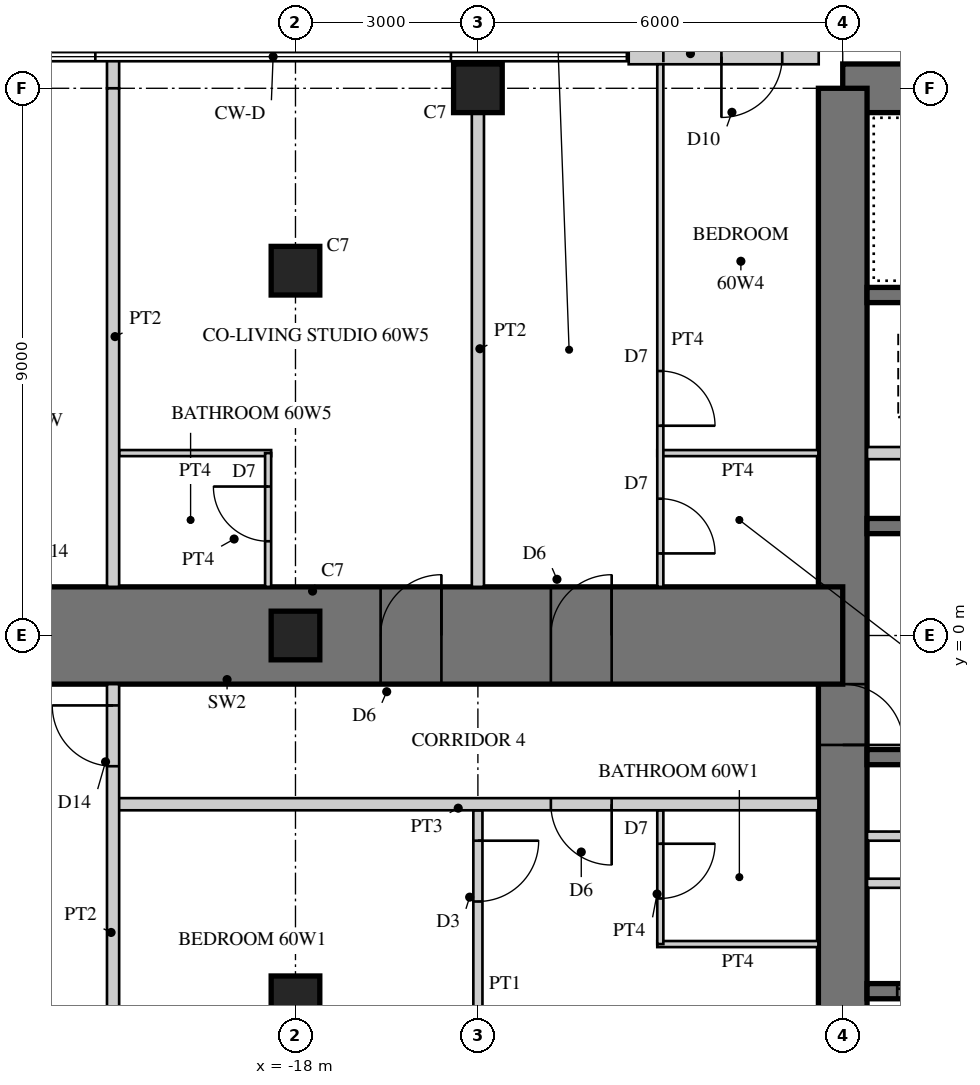
"""IFC4 building model, lengths in metres.
Left out: names, types, materials, properties, quantities, classifications, styles, units other than length and angle.
Written with IfcOpenShell. Run it as: python <this file> out.ifc"""

import sys

from ifc_helpers import new_model, si_unit, direction, frame, frame_2d, origin, origin_2d, place, context, subcontext, project, spatial, rectangle, hollow_rectangle, extrude, element, fill, save


model = new_model("IFC4")
c1 = context("Model", 3, precision=1e-05, world=origin(), true_north=direction((0.0, 1.0)))
c2 = subcontext(c1, "Body", "Model", "MODEL_VIEW")
j1 = project(units=[si_unit("LENGTHUNIT", "METRE"), si_unit("PLANEANGLEUNIT", "RADIAN")], contexts=[c1])
p1 = place(None, origin())
s1 = spatial("IfcSite", under=j1, at=p1, CompositionType="ELEMENT")
p2 = place(p1, origin())
s2 = spatial("IfcBuilding", under=s1, at=p2, CompositionType="ELEMENT")
p3 = place(p2, frame((0.0, 0.0, 235.7)))
s3 = spatial("IfcBuildingStorey", under=s2, at=p3, CompositionType="ELEMENT", Elevation=235.7)
p4 = place(p3, frame((9.0, 9.0, 0.0), z_axis=(0.0, 0.0, 1.0), x_axis=(-1.0, 0.0, 0.0)))
e1 = element("IfcWall", 1, at=p4, inside=s3, PredefinedType="SHEAR", context=c2, shape_type="SweptSolid", body=[
    extrude(rectangle(XDim=18.0, YDim=0.8, at=frame_2d((9.0, 0.0))), origin(), (0.0, 0.0, 1.0), 3.4),
])
p5 = place(p4, frame((9.8, 0.0, 0.0)))
e2 = element("IfcOpeningElement", 2, at=p5, cuts=e1, PredefinedType="OPENING", context=c2, shape_type="SweptSolid", body=[
    extrude(rectangle(XDim=1.0, YDim=2.4, at=frame_2d((0.5, 1.2))), frame((0.0, 0.41, 0.0), z_axis=(0.0, -1.0, 0.0), x_axis=(1.0, 0.0, 0.0)), (0.0, 0.0, 1.0), 0.82),
])
p6 = place(p3, frame((-9.0, 9.0, 0.0), z_axis=(0.0, 0.0, 1.0), x_axis=(0.0, -1.0, 0.0)))
e3 = element("IfcWall", 3, at=p6, inside=s3, PredefinedType="SHEAR", context=c2, shape_type="SweptSolid", body=[
    extrude(rectangle(XDim=18.0, YDim=0.8, at=frame_2d((9.0, 0.0))), origin(), (0.0, 0.0, 1.0), 3.4),
])
p7 = place(p6, frame((9.8, 0.0, 0.0)))
e4 = element("IfcOpeningElement", 4, at=p7, cuts=e3, PredefinedType="OPENING", context=c2, shape_type="SweptSolid", body=[
    extrude(rectangle(XDim=1.0, YDim=2.4, at=frame_2d((0.5, 1.2))), frame((0.0, 0.41, 0.0), z_axis=(0.0, -1.0, 0.0), x_axis=(1.0, 0.0, 0.0)), (0.0, 0.0, 1.0), 0.82),
])
p8 = place(p3, frame((-2.125, 1.8, 0.0), z_axis=(0.0, 0.0, 1.0), x_axis=(-1.0, 0.0, 0.0)))
e5 = element("IfcWall", 5, at=p8, inside=s3, PredefinedType="SHEAR", context=c2, shape_type="SweptSolid", body=[
    extrude(rectangle(XDim=6.475, YDim=0.25, at=frame_2d((3.238, 0.0))), origin(), (0.0, 0.0, 1.0), 3.4),
])
p9 = place(p3, frame((-2.125, 5.6, 0.0), z_axis=(0.0, 0.0, 1.0), x_axis=(-1.0, 0.0, 0.0)))
e6 = element("IfcWall", 6, at=p9, inside=s3, PredefinedType="SHEAR", context=c2, shape_type="SweptSolid", body=[
    extrude(rectangle(XDim=6.475, YDim=0.25, at=frame_2d((3.238, 0.0))), origin(), (0.0, 0.0, 1.0), 3.4),
])
p10 = place(p9, frame((0.175, 0.0, 0.0)))
e7 = element("IfcOpeningElement", 7, at=p10, cuts=e6, PredefinedType="OPENING", context=c2, shape_type="SweptSolid", body=[
    extrude(rectangle(XDim=1.0, YDim=2.1, at=frame_2d((0.5, 1.05))), frame((0.0, 0.135, 0.0), z_axis=(0.0, -1.0, 0.0), x_axis=(1.0, 0.0, 0.0)), (0.0, 0.0, 1.0), 0.27),
])
p11 = place(p3, frame((-5.725, 3.0, 0.0), z_axis=(0.0, 0.0, 1.0), x_axis=(-1.0, 0.0, 0.0)))
e8 = element("IfcWall", 8, at=p11, inside=s3, PredefinedType="PARTITIONING", context=c2, shape_type="SweptSolid", body=[
    extrude(rectangle(XDim=2.875, YDim=0.2, at=frame_2d((1.438, 0.0))), origin(), (0.0, 0.0, 1.0), 3.4),
])
p12 = place(p3, frame((-1.925, -2.0, 0.0), z_axis=(0.0, 0.0, 1.0), x_axis=(-1.0, 0.0, 0.0)))
e9 = element("IfcWall", 9, at=p12, inside=s3, PredefinedType="SHEAR", context=c2, shape_type="SweptSolid", body=[
    extrude(rectangle(XDim=6.675, YDim=0.25, at=frame_2d((3.337, 0.0))), origin(), (0.0, 0.0, 1.0), 3.4),
])
p13 = place(p3, frame((-1.925, -5.85, 0.0), z_axis=(0.0, 0.0, 1.0), x_axis=(-1.0, 0.0, 0.0)))
e10 = element("IfcWall", 10, at=p13, inside=s3, PredefinedType="SHEAR", context=c2, shape_type="SweptSolid", body=[
    extrude(rectangle(XDim=6.675, YDim=0.25, at=frame_2d((3.337, 0.0))), origin(), (0.0, 0.0, 1.0), 3.4),
])
p14 = place(p13, frame((0.496, 0.0, 0.0)))
e11 = element("IfcOpeningElement", 11, at=p14, cuts=e10, PredefinedType="OPENING", context=c2, shape_type="SweptSolid", body=[
    extrude(rectangle(XDim=1.1, YDim=2.2, at=frame_2d((0.55, 1.1))), frame((0.0, 0.135, 0.0), z_axis=(0.0, -1.0, 0.0), x_axis=(1.0, 0.0, 0.0)), (0.0, 0.0, 1.0), 0.27),
])
p15 = place(p13, frame((2.788, 0.0, 0.0)))
e12 = element("IfcOpeningElement", 12, at=p15, cuts=e10, PredefinedType="OPENING", context=c2, shape_type="SweptSolid", body=[
    extrude(rectangle(XDim=1.1, YDim=2.2, at=frame_2d((0.55, 1.1))), frame((0.0, 0.135, 0.0), z_axis=(0.0, -1.0, 0.0), x_axis=(1.0, 0.0, 0.0)), (0.0, 0.0, 1.0), 0.27),
])
p16 = place(p13, frame((5.079, 0.0, 0.0)))
e13 = element("IfcOpeningElement", 13, at=p16, cuts=e10, PredefinedType="OPENING", context=c2, shape_type="SweptSolid", body=[
    extrude(rectangle(XDim=1.1, YDim=2.2, at=frame_2d((0.55, 1.1))), frame((0.0, 0.135, 0.0), z_axis=(0.0, -1.0, 0.0), x_axis=(1.0, 0.0, 0.0)), (0.0, 0.0, 1.0), 0.27),
])
p17 = place(p3, frame((-1.925, -3.3, 0.0), z_axis=(0.0, 0.0, 1.0), x_axis=(-1.0, 0.0, 0.0)))
e14 = element("IfcWall", 14, at=p17, inside=s3, PredefinedType="PARTITIONING", context=c2, shape_type="SweptSolid", body=[
    extrude(rectangle(XDim=6.675, YDim=0.15, at=frame_2d((3.337, 0.0))), origin(), (0.0, 0.0, 1.0), 3.4),
])
p18 = place(p17, frame((0.075, 0.0, 0.0)))
e15 = element("IfcOpeningElement", 15, at=p18, cuts=e14, PredefinedType="OPENING", context=c2, shape_type="SweptSolid", body=[
    extrude(rectangle(XDim=0.8, YDim=2.1, at=frame_2d((0.4, 1.05))), frame((0.0, 0.085, 0.0), z_axis=(0.0, -1.0, 0.0), x_axis=(1.0, 0.0, 0.0)), (0.0, 0.0, 1.0), 0.17),
])
p19 = place(p17, frame((3.675, 0.0, 0.0)))
e16 = element("IfcOpeningElement", 16, at=p19, cuts=e14, PredefinedType="OPENING", context=c2, shape_type="SweptSolid", body=[
    extrude(rectangle(XDim=0.8, YDim=2.1, at=frame_2d((0.4, 1.05))), frame((0.0, 0.085, 0.0), z_axis=(0.0, -1.0, 0.0), x_axis=(1.0, 0.0, 0.0)), (0.0, 0.0, 1.0), 0.17),
])
p20 = place(p3, frame((-9.0, 0.0, 0.0), z_axis=(0.0, 0.0, 1.0), x_axis=(-1.0, 0.0, 0.0)))
e17 = element("IfcWall", 17, at=p20, inside=s3, PredefinedType="SHEAR", context=c2, shape_type="SweptSolid", body=[
    extrude(rectangle(XDim=18.0, YDim=1.6, at=frame_2d((9.0, 0.0))), origin(), (0.0, 0.0, 1.0), 3.4),
])
p21 = place(p20, frame((3.8, 0.0, 0.0)))
e18 = element("IfcOpeningElement", 18, at=p21, cuts=e17, PredefinedType="OPENING", context=c2, shape_type="SweptSolid", body=[
    extrude(rectangle(XDim=1.0, YDim=2.15, at=frame_2d((0.5, 1.075))), frame((0.0, 0.81, 0.0), z_axis=(0.0, -1.0, 0.0), x_axis=(1.0, 0.0, 0.0)), (0.0, 0.0, 1.0), 1.62),
])
p22 = place(p20, frame((6.6, 0.0, 0.0)))
e19 = element("IfcOpeningElement", 19, at=p22, cuts=e17, PredefinedType="OPENING", context=c2, shape_type="SweptSolid", body=[
    extrude(rectangle(XDim=1.0, YDim=2.15, at=frame_2d((0.5, 1.075))), frame((0.0, 0.81, 0.0), z_axis=(0.0, -1.0, 0.0), x_axis=(1.0, 0.0, 0.0)), (0.0, 0.0, 1.0), 1.62),
])
p23 = place(p20, frame((13.3, 0.0, 0.0)))
e20 = element("IfcOpeningElement", 20, at=p23, cuts=e17, PredefinedType="OPENING", context=c2, shape_type="SweptSolid", body=[
    extrude(rectangle(XDim=1.0, YDim=2.2, at=frame_2d((0.5, 1.1))), frame((0.0, 0.81, 0.0), z_axis=(0.0, -1.0, 0.0), x_axis=(1.0, 0.0, 0.0)), (0.0, 0.0, 1.0), 1.62),
])
for number, where, z_axis, x_axis in (
    (21, (-15.0, 9.0, 0.0), (0.0, 0.0, 1.0), (1.0, 0.0, 0.0)),
    (22, (-18.0, 6.0, 0.0), (0.0, 0.0, 1.0), (1.0, 0.0, 0.0)),
    (23, (-18.0, 0.0, 0.0), (0.0, 0.0, 1.0), (1.0, 0.0, 0.0)),
    (24, (-18.0, -6.0, 0.0), (0.0, 0.0, 1.0), (1.0, 0.0, 0.0)),
):
    element("IfcColumn", number, at=place(p3, frame(where, z_axis=z_axis, x_axis=x_axis)), inside=s3, PredefinedType="COLUMN", context=c2, shape_type="SweptSolid", body=[
        extrude(rectangle(XDim=0.8, YDim=0.8, at=origin_2d()), origin(), (0.0, 0.0, 1.0), 3.4),
    ])
p24 = place(p3, frame((-9.395, 9.52, 0.0), z_axis=(0.0, 0.0, 1.0), x_axis=(-1.0, 0.0, 0.0)))
e25 = element("IfcWall", 25, at=p24, inside=s3, PredefinedType="SOLIDWALL", context=c2, shape_type="SweptSolid", body=[
    extrude(rectangle(XDim=3.125, YDim=0.25, at=frame_2d((1.562, 0.0))), origin(), (0.0, 0.0, 1.0), 3.22),
])
p25 = place(p24, frame((0.6, 0.0, 0.0)))
e26 = element("IfcOpeningElement", 26, at=p25, cuts=e25, PredefinedType="OPENING", context=c2, shape_type="SweptSolid", body=[
    extrude(rectangle(XDim=1.0, YDim=2.2, at=frame_2d((0.5, 1.1))), frame((0.0, 0.135, 0.0), z_axis=(0.0, -1.0, 0.0), x_axis=(1.0, 0.0, 0.0)), (0.0, 0.0, 1.0), 0.27),
])
p26 = place(p3, frame((-3.325, -4.075, 0.0), z_axis=(0.0, 0.0, 1.0), x_axis=(-1.0, 0.0, 0.0)))
e27 = element("IfcWall", 27, at=p26, inside=s3, PredefinedType="PARTITIONING", context=c2, shape_type="SweptSolid", body=[
    extrude(rectangle(XDim=5.275, YDim=0.15, at=frame_2d((2.638, 0.0))), origin(), (0.0, 0.0, 1.0), 3.22),
])
p27 = place(p26, frame((2.137, 0.0, 0.0)))
e28 = element("IfcOpeningElement", 28, at=p27, cuts=e27, PredefinedType="OPENING", context=c2, shape_type="SweptSolid", body=[
    extrude(rectangle(XDim=1.0, YDim=2.1, at=frame_2d((0.5, 1.05))), frame((0.0, 0.085, 0.0), z_axis=(0.0, -1.0, 0.0), x_axis=(1.0, 0.0, 0.0)), (0.0, 0.0, 1.0), 0.17),
])
p28 = place(p3, frame((-9.4, -5.075, 0.0), z_axis=(0.0, 0.0, 1.0), x_axis=(-1.0, 0.0, 0.0)))
e29 = element("IfcWall", 29, at=p28, inside=s3, PredefinedType="PARTITIONING", context=c2, shape_type="SweptSolid", body=[
    extrude(rectangle(XDim=2.65, YDim=0.1, at=frame_2d((1.325, 0.0))), origin(), (0.0, 0.0, 1.0), 3.22),
])
p29 = place(p3, frame((-12.0, -2.875, 0.0), z_axis=(0.0, 0.0, 1.0), x_axis=(0.0, -1.0, 0.0)))
e30 = element("IfcWall", 30, at=p29, inside=s3, PredefinedType="PARTITIONING", context=c2, shape_type="SweptSolid", body=[
    extrude(rectangle(XDim=2.2, YDim=0.1, at=frame_2d((1.1, 0.0))), origin(), (0.0, 0.0, 1.0), 3.22),
])
p30 = place(p29, frame((0.55, 0.0, 0.0)))
e31 = element("IfcOpeningElement", 31, at=p30, cuts=e30, PredefinedType="OPENING", context=c2, shape_type="SweptSolid", body=[
    extrude(rectangle(XDim=0.9, YDim=2.1, at=frame_2d((0.45, 1.05))), frame((0.0, 0.06, 0.0), z_axis=(0.0, -1.0, 0.0), x_axis=(1.0, 0.0, 0.0)), (0.0, 0.0, 1.0), 0.12),
])
p31 = place(p3, frame((-15.0, -2.875, 0.0), z_axis=(0.0, 0.0, 1.0), x_axis=(0.0, -1.0, 0.0)))
e32 = element("IfcWall", 32, at=p31, inside=s3, PredefinedType="PARTITIONING", context=c2, shape_type="SweptSolid", body=[
    extrude(rectangle(XDim=5.725, YDim=0.15, at=frame_2d((2.863, 0.0))), origin(), (0.0, 0.0, 1.0), 2.52),
])
p32 = place(p31, frame((0.5, 0.0, 0.0)))
e33 = element("IfcOpeningElement", 33, at=p32, cuts=e32, PredefinedType="OPENING", context=c2, shape_type="SweptSolid", body=[
    extrude(rectangle(XDim=1.0, YDim=2.1, at=frame_2d((0.5, 1.05))), frame((0.0, 0.085, 0.0), z_axis=(0.0, -1.0, 0.0), x_axis=(1.0, 0.0, 0.0)), (0.0, 0.0, 1.0), 0.17),
])
p33 = place(p3, frame((-9.4, 3.0, 0.0), z_axis=(0.0, 0.0, 1.0), x_axis=(-1.0, 0.0, 0.0)))
e34 = element("IfcWall", 34, at=p33, inside=s3, PredefinedType="PARTITIONING", context=c2, shape_type="SweptSolid", body=[
    extrude(rectangle(XDim=2.65, YDim=0.1, at=frame_2d((1.325, 0.0))), origin(), (0.0, 0.0, 1.0), 3.22),
])
p34 = place(p3, frame((-12.0, 9.395, 0.0), z_axis=(0.0, 0.0, 1.0), x_axis=(0.0, -1.0, 0.0)))
e35 = element("IfcWall", 35, at=p34, inside=s3, PredefinedType="PARTITIONING", context=c2, shape_type="SweptSolid", body=[
    extrude(rectangle(XDim=8.595, YDim=0.1, at=frame_2d((4.297, 0.0))), origin(), (0.0, 0.0, 1.0), 3.22),
])
p35 = place(p34, frame((5.045, 0.0, 0.0)))
e36 = element("IfcOpeningElement", 36, at=p35, cuts=e35, PredefinedType="OPENING", context=c2, shape_type="SweptSolid", body=[
    extrude(rectangle(XDim=0.9, YDim=2.1, at=frame_2d((0.45, 1.05))), frame((0.0, 0.06, 0.0), z_axis=(0.0, -1.0, 0.0), x_axis=(1.0, 0.0, 0.0)), (0.0, 0.0, 1.0), 0.12),
])
p36 = place(p34, frame((7.145, 0.0, 0.0)))
e37 = element("IfcOpeningElement", 37, at=p36, cuts=e35, PredefinedType="OPENING", context=c2, shape_type="SweptSolid", body=[
    extrude(rectangle(XDim=0.9, YDim=2.1, at=frame_2d((0.45, 1.05))), frame((0.0, 0.06, 0.0), z_axis=(0.0, -1.0, 0.0), x_axis=(1.0, 0.0, 0.0)), (0.0, 0.0, 1.0), 0.12),
])
p37 = place(p3, frame((-15.0, 8.6, 0.0), z_axis=(0.0, 0.0, 1.0), x_axis=(0.0, -1.0, 0.0)))
e38 = element("IfcWall", 38, at=p37, inside=s3, PredefinedType="SOLIDWALL", context=c2, shape_type="SweptSolid", body=[
    extrude(rectangle(XDim=7.8, YDim=0.2, at=frame_2d((3.9, 0.0))), origin(), (0.0, 0.0, 1.0), 2.52),
])
p38 = place(p3, frame((-18.4, 3.0, 0.0), z_axis=(0.0, 0.0, 1.0), x_axis=(-1.0, 0.0, 0.0)))
e39 = element("IfcWall", 39, at=p38, inside=s3, PredefinedType="PARTITIONING", context=c2, shape_type="SweptSolid", body=[
    extrude(rectangle(XDim=2.5, YDim=0.1, at=frame_2d((1.25, 0.0))), origin(), (0.0, 0.0, 1.0), 3.22),
])
p39 = place(p3, frame((-18.45, 3.0, 0.0), z_axis=(0.0, 0.0, 1.0), x_axis=(0.0, -1.0, 0.0)))
e40 = element("IfcWall", 40, at=p39, inside=s3, PredefinedType="PARTITIONING", context=c2, shape_type="SweptSolid", body=[
    extrude(rectangle(XDim=2.2, YDim=0.1, at=frame_2d((1.1, 0.0))), origin(), (0.0, 0.0, 1.0), 3.22),
])
p40 = place(p39, frame((0.55, 0.0, 0.0)))
e41 = element("IfcOpeningElement", 41, at=p40, cuts=e40, PredefinedType="OPENING", context=c2, shape_type="SweptSolid", body=[
    extrude(rectangle(XDim=0.9, YDim=2.1, at=frame_2d((0.45, 1.05))), frame((0.0, 0.06, 0.0), z_axis=(0.0, -1.0, 0.0), x_axis=(1.0, 0.0, 0.0)), (0.0, 0.0, 1.0), 0.12),
])
p41 = place(p3, frame((-9.4, -2.775, 0.0), z_axis=(0.0, 0.0, 1.0), x_axis=(-1.0, 0.0, 0.0)))
e42 = element("IfcWall", 42, at=p41, inside=s3, PredefinedType="SOLIDWALL", context=c2, shape_type="SweptSolid", body=[
    extrude(rectangle(XDim=11.6, YDim=0.2, at=frame_2d((5.8, 0.0))), origin(), (0.0, 0.0, 1.0), 3.22),
])
p42 = place(p41, frame((3.4, 0.0, 0.0)))
e43 = element("IfcOpeningElement", 43, at=p42, cuts=e42, PredefinedType="OPENING", context=c2, shape_type="SweptSolid", body=[
    extrude(rectangle(XDim=1.0, YDim=2.15, at=frame_2d((0.5, 1.075))), frame((0.0, 0.11, 0.0), z_axis=(0.0, -1.0, 0.0), x_axis=(1.0, 0.0, 0.0)), (0.0, 0.0, 1.0), 0.22),
])
p43 = place(p3, frame((-21.0, 9.48, 0.0), z_axis=(0.0, 0.0, 1.0), x_axis=(0.0, -1.0, 0.0)))
e44 = element("IfcWall", 44, at=p43, inside=s3, PredefinedType="SOLIDWALL", context=c2, shape_type="SweptSolid", body=[
    extrude(rectangle(XDim=0.48, YDim=0.2, at=frame_2d((0.24, 0.0))), origin(), (0.0, 0.0, 1.0), 3.22),
])
p44 = place(p3, frame((-21.0, 9.0, 0.0), z_axis=(0.0, 0.0, 1.0), x_axis=(0.0, -1.0, 0.0)))
e45 = element("IfcWall", 45, at=p44, inside=s3, PredefinedType="SOLIDWALL", context=c2, shape_type="SweptSolid", body=[
    extrude(rectangle(XDim=8.2, YDim=0.2, at=frame_2d((4.1, 0.0))), origin(), (0.0, 0.0, 1.0), 2.67),
])
p45 = place(p3, frame((-21.0, -0.8, 0.0), z_axis=(0.0, 0.0, 1.0), x_axis=(0.0, -1.0, 0.0)))
e46 = element("IfcWall", 46, at=p45, inside=s3, PredefinedType="SOLIDWALL", context=c2, shape_type="SweptSolid", body=[
    extrude(rectangle(XDim=8.2, YDim=0.2, at=frame_2d((4.1, 0.0))), origin(), (0.0, 0.0, 1.0), 2.67),
])
p46 = place(p45, frame((0.35, 0.0, 0.0)))
e47 = element("IfcOpeningElement", 47, at=p46, cuts=e46, PredefinedType="OPENING", context=c2, shape_type="SweptSolid", body=[
    extrude(rectangle(XDim=1.0, YDim=2.2, at=frame_2d((0.5, 1.1))), frame((0.0, 0.11, 0.0), z_axis=(0.0, -1.0, 0.0), x_axis=(1.0, 0.0, 0.0)), (0.0, 0.0, 1.0), 0.22),
])
p47 = place(p25, origin())
e48 = element("IfcDoor", 48, at=p47, inside=s3, OperationType="SINGLE_SWING_RIGHT", PredefinedType="DOOR", context=c2, shape_type="SweptSolid", body=[
    extrude(hollow_rectangle(XDim=1.0, YDim=2.2, WallThickness=0.06, at=frame_2d((0.5, 1.1))), frame((0.0, 0.025, 0.0), z_axis=(0.0, -1.0, 0.0), x_axis=(1.0, 0.0, 0.0)), (0.0, 0.0, 1.0), 0.05),
    extrude(rectangle(XDim=0.879, YDim=2.079, at=frame_2d((0.5, 1.1))), frame((0.0, 0.025, 0.0), z_axis=(0.0, -1.0, 0.0), x_axis=(1.0, 0.0, 0.0)), (0.0, 0.0, 1.0), 0.05),
])
fill(e26, e48)
p48 = place(p30, origin())
e49 = element("IfcDoor", 49, at=p48, inside=s3, OperationType="SINGLE_SWING_LEFT", PredefinedType="DOOR", context=c2, shape_type="SweptSolid", body=[
    extrude(rectangle(XDim=0.9, YDim=2.1, at=frame_2d((0.45, 1.05))), frame((0.0, 0.025, 0.0), z_axis=(0.0, -1.0, 0.0), x_axis=(1.0, 0.0, 0.0)), (0.0, 0.0, 1.0), 0.05),
])
fill(e31, e49)
p49 = place(p32, origin())
e50 = element("IfcDoor", 50, at=p49, inside=s3, OperationType="SINGLE_SWING_LEFT", PredefinedType="DOOR", context=c2, shape_type="SweptSolid", body=[
    extrude(rectangle(XDim=1.0, YDim=2.1, at=frame_2d((0.5, 1.05))), frame((0.0, 0.025, 0.0), z_axis=(0.0, -1.0, 0.0), x_axis=(1.0, 0.0, 0.0)), (0.0, 0.0, 1.0), 0.05),
])
fill(e33, e50)
p50 = place(p35, origin())
e51 = element("IfcDoor", 51, at=p50, inside=s3, OperationType="SINGLE_SWING_RIGHT", PredefinedType="DOOR", context=c2, shape_type="SweptSolid", body=[
    extrude(rectangle(XDim=0.9, YDim=2.1, at=frame_2d((0.45, 1.05))), frame((0.0, 0.025, 0.0), z_axis=(0.0, -1.0, 0.0), x_axis=(1.0, 0.0, 0.0)), (0.0, 0.0, 1.0), 0.05),
])
fill(e36, e51)
p51 = place(p36, origin())
e52 = element("IfcDoor", 52, at=p51, inside=s3, OperationType="SINGLE_SWING_RIGHT", PredefinedType="DOOR", context=c2, shape_type="SweptSolid", body=[
    extrude(rectangle(XDim=0.9, YDim=2.1, at=frame_2d((0.45, 1.05))), frame((0.0, 0.025, 0.0), z_axis=(0.0, -1.0, 0.0), x_axis=(1.0, 0.0, 0.0)), (0.0, 0.0, 1.0), 0.05),
])
fill(e37, e52)
p52 = place(p40, frame((0.9, 0.0, 0.0), z_axis=(0.0, 0.0, 1.0), x_axis=(-1.0, 0.0, 0.0)))
e53 = element("IfcDoor", 53, at=p52, inside=s3, OperationType="SINGLE_SWING_RIGHT", PredefinedType="DOOR", context=c2, shape_type="SweptSolid", body=[
    extrude(rectangle(XDim=0.9, YDim=2.1, at=frame_2d((0.45, 1.05))), frame((0.0, 0.025, 0.0), z_axis=(0.0, -1.0, 0.0), x_axis=(1.0, 0.0, 0.0)), (0.0, 0.0, 1.0), 0.05),
])
fill(e41, e53)
p53 = place(p42, origin())
e54 = element("IfcDoor", 54, at=p53, inside=s3, OperationType="SINGLE_SWING_LEFT", PredefinedType="DOOR", context=c2, shape_type="SweptSolid", body=[
    extrude(rectangle(XDim=1.0, YDim=2.15, at=frame_2d((0.5, 1.075))), frame((0.0, 0.025, 0.0), z_axis=(0.0, -1.0, 0.0), x_axis=(1.0, 0.0, 0.0)), (0.0, 0.0, 1.0), 0.05),
])
fill(e43, e54)
p54 = place(p46, frame((1.0, 0.0, 0.0), z_axis=(0.0, 0.0, 1.0), x_axis=(-1.0, 0.0, 0.0)))
e55 = element("IfcDoor", 55, at=p54, inside=s3, OperationType="SINGLE_SWING_RIGHT", PredefinedType="DOOR", context=c2, shape_type="SweptSolid", body=[
    extrude(rectangle(XDim=1.0, YDim=2.2, at=frame_2d((0.5, 1.1))), frame((0.0, 0.025, 0.0), z_axis=(0.0, -1.0, 0.0), x_axis=(1.0, 0.0, 0.0)), (0.0, 0.0, 1.0), 0.05),
])
fill(e47, e55)
p55 = place(p21, frame((1.0, 0.0, 0.0), z_axis=(0.0, 0.0, 1.0), x_axis=(-1.0, 0.0, 0.0)))
e56 = element("IfcDoor", 56, at=p55, inside=s3, OperationType="SINGLE_SWING_RIGHT", PredefinedType="DOOR", context=c2, shape_type="SweptSolid", body=[
    extrude(rectangle(XDim=1.0, YDim=2.15, at=frame_2d((0.5, 1.075))), frame((0.0, 0.025, 0.0), z_axis=(0.0, -1.0, 0.0), x_axis=(1.0, 0.0, 0.0)), (0.0, 0.0, 1.0), 0.05),
])
fill(e18, e56)
p56 = place(p22, frame((1.0, 0.0, 0.0), z_axis=(0.0, 0.0, 1.0), x_axis=(-1.0, 0.0, 0.0)))
e57 = element("IfcDoor", 57, at=p56, inside=s3, OperationType="SINGLE_SWING_RIGHT", PredefinedType="DOOR", context=c2, shape_type="SweptSolid", body=[
    extrude(rectangle(XDim=1.0, YDim=2.15, at=frame_2d((0.5, 1.075))), frame((0.0, 0.025, 0.0), z_axis=(0.0, -1.0, 0.0), x_axis=(1.0, 0.0, 0.0)), (0.0, 0.0, 1.0), 0.05),
])
fill(e19, e57)
p57 = place(p7, origin())
e58 = element("IfcDoor", 58, at=p57, inside=s3, OperationType="SINGLE_SWING_RIGHT", PredefinedType="DOOR", context=c2, shape_type="SweptSolid", body=[
    extrude(rectangle(XDim=1.0, YDim=2.4, at=frame_2d((0.5, 1.2))), frame((0.0, 0.055, 0.0), z_axis=(0.0, -1.0, 0.0), x_axis=(1.0, 0.0, 0.0)), (0.0, 0.0, 1.0), 0.05),
])
fill(e4, e58)
p58 = place(p16, origin())
e59 = element("IfcDoor", 59, at=p58, inside=s3, OperationType="DOUBLE_DOOR_SLIDING", PredefinedType="DOOR", context=c2, shape_type="SweptSolid", body=[
    extrude(rectangle(XDim=1.1, YDim=2.2, at=frame_2d((0.55, 1.1))), frame((0.0, 0.025, 0.0), z_axis=(0.0, -1.0, 0.0), x_axis=(1.0, 0.0, 0.0)), (0.0, 0.0, 1.0), 0.05),
])
fill(e13, e59)
save(model, sys.argv[1])
